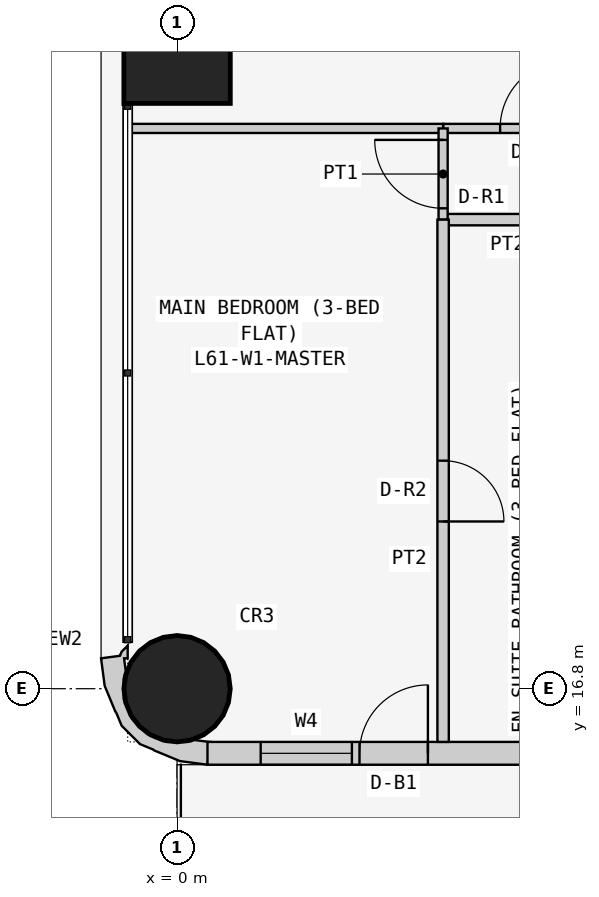
"""IFC4 building model, lengths in metres.
Left out: names, types, materials, properties, quantities, classifications, styles, units other than length and angle.
Written with IfcOpenShell. Run it as: python <this file> out.ifc"""

import sys

from ifc_helpers import new_model, si_unit, direction, frame, frame_2d, origin, origin_2d, place, context, subcontext, project, spatial, polyline, rectangle, circle, outline, extrude, element, fill, save


model = new_model("IFC4")
c1 = context("Model", 3, precision=1e-05, world=origin(), true_north=direction((0.0, 1.0)))
c2 = subcontext(c1, "Body", "Model", "MODEL_VIEW")
j1 = project(units=[si_unit("LENGTHUNIT", "METRE"), si_unit("PLANEANGLEUNIT", "RADIAN")], contexts=[c1])
p1 = place(None, origin())
s1 = spatial("IfcSite", under=j1, at=p1, CompositionType="ELEMENT")
p2 = place(p1, origin())
s2 = spatial("IfcBuilding", under=s1, at=p2, CompositionType="ELEMENT")
p3 = place(p2, frame((0.0, 0.0, 233.7)))
s3 = spatial("IfcBuildingStorey", under=s2, at=p3, CompositionType="ELEMENT", Elevation=233.7)
p4 = place(p3, frame((0.0, 16.8, 0.0), z_axis=(0.0, 0.0, 1.0), x_axis=(1.0, 0.0, 0.0)))
e1 = element("IfcColumn", 1, at=p4, inside=s3, PredefinedType="COLUMN", context=c2, shape_type="SweptSolid", body=[
    extrude(circle(Radius=0.7, at=origin_2d()), origin(), (0.0, 0.0, 1.0), 3.6),
])
p5 = place(p3, frame((0.0, 25.2, 0.0), z_axis=(0.0, 0.0, 1.0), x_axis=(1.0, 0.0, 0.0)))
e2 = element("IfcColumn", 2, at=p5, inside=s3, PredefinedType="COLUMN", context=c2, shape_type="SweptSolid", body=[
    extrude(rectangle(XDim=1.4, YDim=1.4, at=origin_2d()), origin(), (0.0, 0.0, 1.0), 3.6),
])
p6 = place(p3, frame((0.4, 15.95, 0.0), z_axis=(0.0, 0.0, 1.0), x_axis=(1.0, 0.0, 0.0)))
e3 = element("IfcWall", 3, at=p6, inside=s3, PredefinedType="SOLIDWALL", context=c2, shape_type="SweptSolid", body=[
    extrude(rectangle(XDim=15.7, YDim=0.3, at=frame_2d((7.85, 0.0))), origin(), (0.0, 0.0, 1.0), 3.45),
])
p7 = place(p6, frame((12.4, 0.0, 0.9)))
e4 = element("IfcOpeningElement", 4, at=p7, cuts=e3, PredefinedType="OPENING", context=c2, shape_type="SweptSolid", body=[
    extrude(rectangle(XDim=1.8, YDim=1.5, at=frame_2d((0.9, 0.75))), frame((0.0, 0.16, 0.0), z_axis=(0.0, -1.0, 0.0), x_axis=(1.0, 0.0, 0.0)), (0.0, 0.0, 1.0), 0.32),
])
p8 = place(p6, frame((9.55, 0.0, 1.5)))
e5 = element("IfcOpeningElement", 5, at=p8, cuts=e3, PredefinedType="OPENING", context=c2, shape_type="SweptSolid", body=[
    extrude(rectangle(XDim=0.9, YDim=0.7, at=frame_2d((0.45, 0.35))), frame((0.0, 0.16, 0.0), z_axis=(0.0, -1.0, 0.0), x_axis=(1.0, 0.0, 0.0)), (0.0, 0.0, 1.0), 0.32),
])
p9 = place(p6, frame((5.1, 0.0, 0.9)))
e6 = element("IfcOpeningElement", 6, at=p9, cuts=e3, PredefinedType="OPENING", context=c2, shape_type="SweptSolid", body=[
    extrude(rectangle(XDim=1.8, YDim=1.5, at=frame_2d((0.9, 0.75))), frame((0.0, 0.16, 0.0), z_axis=(0.0, -1.0, 0.0), x_axis=(1.0, 0.0, 0.0)), (0.0, 0.0, 1.0), 0.32),
])
p10 = place(p6, frame((2.0, 0.0, 0.0)))
e7 = element("IfcOpeningElement", 7, at=p10, cuts=e3, PredefinedType="OPENING", context=c2, shape_type="SweptSolid", body=[
    extrude(rectangle(XDim=0.9, YDim=2.4, at=frame_2d((0.45, 1.2))), frame((0.0, 0.16, 0.0), z_axis=(0.0, -1.0, 0.0), x_axis=(1.0, 0.0, 0.0)), (0.0, 0.0, 1.0), 0.32),
])
p11 = place(p6, frame((0.7, 0.0, 0.9)))
e8 = element("IfcOpeningElement", 8, at=p11, cuts=e3, PredefinedType="OPENING", context=c2, shape_type="SweptSolid", body=[
    extrude(rectangle(XDim=1.2, YDim=1.5, at=frame_2d((0.6, 0.75))), frame((0.0, 0.16, 0.0), z_axis=(0.0, -1.0, 0.0), x_axis=(1.0, 0.0, 0.0)), (0.0, 0.0, 1.0), 0.32),
])
p12 = place(p3, frame((-0.588, 17.312, 0.0), z_axis=(0.0, 0.0, 1.0), x_axis=(-0.898030234854, -0.439933741929, 0.0)))
e9 = element("IfcWall", 9, at=p12, inside=s3, PredefinedType="SOLIDWALL", context=c2, shape_type="SweptSolid", body=[
    extrude(outline(polyline([(-0.222, 1.793), (-0.39, 1.541), (-0.372, 1.532), (-0.195, 1.415), (-0.12, 1.41), (0.131, 1.287), (0.315, 1.078), (0.406, 0.814), (0.388, 0.536), (0.265, 0.285), (0.209, 0.236), (0.148, 0.053), (0.105, 0.074), (0.032, -0.076), (0.138, -0.039), (0.182, -0.0), (0.419, -0.08), (0.536, 0.266), (0.559, 0.631), (0.555, 0.651), (0.566, 0.836), (0.456, 1.159), (0.333, 1.298), (0.324, 1.316), (0.082, 1.591), (-0.222, 1.793)])), origin(), (0.0, 0.0, 1.0), 3.45),
])
p13 = place(p3, frame((3.5, 24.171, 0.0), z_axis=(0.0, 0.0, 1.0), x_axis=(1.0, 0.0, 0.0)))
e10 = element("IfcWall", 10, at=p13, inside=s3, PredefinedType="PARTITIONING", context=c2, shape_type="SweptSolid", body=[
    extrude(rectangle(XDim=4.05, YDim=0.12, at=frame_2d((2.025, 0.0))), origin(), (0.0, 0.0, 1.0), 3.45),
])
p14 = place(p13, frame((0.75, 0.0, 0.0)))
e11 = element("IfcOpeningElement", 11, at=p14, cuts=e10, PredefinedType="OPENING", context=c2, shape_type="SweptSolid", body=[
    extrude(rectangle(XDim=0.9, YDim=2.1, at=frame_2d((0.45, 1.05))), frame((0.0, 0.07, 0.0), z_axis=(0.0, -1.0, 0.0), x_axis=(1.0, 0.0, 0.0)), (0.0, 0.0, 1.0), 0.14),
])
p15 = place(p3, frame((-0.65, 24.171, 0.0), z_axis=(0.0, 0.0, 1.0), x_axis=(1.0, 0.0, 0.0)))
e12 = element("IfcWall", 12, at=p15, inside=s3, PredefinedType="PARTITIONING", context=c2, shape_type="SweptSolid", body=[
    extrude(rectangle(XDim=4.15, YDim=0.12, at=frame_2d((2.075, 0.0))), origin(), (0.0, 0.0, 1.0), 3.45),
])
p16 = place(p3, frame((3.5, 22.971, 0.0), z_axis=(0.0, 0.0, 1.0), x_axis=(1.0, 0.0, 0.0)))
e13 = element("IfcWall", 13, at=p16, inside=s3, PredefinedType="PARTITIONING", context=c2, shape_type="SweptSolid", body=[
    extrude(rectangle(XDim=1.7, YDim=0.15, at=frame_2d((0.85, 0.0))), origin(), (0.0, 0.0, 1.0), 3.45),
])
p17 = place(p3, frame((3.5, 24.171, 0.0), z_axis=(0.0, 0.0, 1.0), x_axis=(0.0, -1.0, 0.0)))
e14 = element("IfcWall", 14, at=p17, inside=s3, PredefinedType="PARTITIONING", context=c2, shape_type="SweptSolid", body=[
    extrude(rectangle(XDim=1.2, YDim=0.12, at=frame_2d((0.6, 0.0))), origin(), (0.0, 0.0, 1.0), 3.45),
])
p18 = place(p17, frame((0.151, 0.0, 0.0)))
e15 = element("IfcOpeningElement", 15, at=p18, cuts=e14, PredefinedType="OPENING", context=c2, shape_type="SweptSolid", body=[
    extrude(rectangle(XDim=0.9, YDim=2.1, at=frame_2d((0.45, 1.05))), frame((0.0, 0.07, 0.0), z_axis=(0.0, -1.0, 0.0), x_axis=(1.0, 0.0, 0.0)), (0.0, 0.0, 1.0), 0.14),
])
p19 = place(p3, frame((3.5, 22.971, 0.0), z_axis=(0.0, 0.0, 1.0), x_axis=(0.0, -1.0, 0.0)))
e16 = element("IfcWall", 16, at=p19, inside=s3, PredefinedType="PARTITIONING", context=c2, shape_type="SweptSolid", body=[
    extrude(rectangle(XDim=6.871, YDim=0.15, at=frame_2d((3.436, 0.0))), origin(), (0.0, 0.0, 1.0), 3.45),
])
p20 = place(p19, frame((3.171, 0.0, 0.0)))
e17 = element("IfcOpeningElement", 17, at=p20, cuts=e16, PredefinedType="OPENING", context=c2, shape_type="SweptSolid", body=[
    extrude(rectangle(XDim=0.8, YDim=2.1, at=frame_2d((0.4, 1.05))), frame((0.0, 0.085, 0.0), z_axis=(0.0, -1.0, 0.0), x_axis=(1.0, 0.0, 0.0)), (0.0, 0.0, 1.0), 0.17),
])
p21 = place(p10, origin())
e18 = element("IfcDoor", 18, at=p21, inside=s3, OperationType="SINGLE_SWING_RIGHT", PredefinedType="DOOR", context=c2, shape_type="SweptSolid", body=[
    extrude(rectangle(XDim=0.9, YDim=2.4, at=frame_2d((0.45, 1.2))), frame((0.0, 0.025, 0.0), z_axis=(0.0, -1.0, 0.0), x_axis=(1.0, 0.0, 0.0)), (0.0, 0.0, 1.0), 0.05),
])
fill(e7, e18)
p22 = place(p11, origin())
e19 = element("IfcWindow", 19, at=p22, inside=s3, PartitioningType="SINGLE_PANEL", PredefinedType="WINDOW", context=c2, shape_type="SweptSolid", body=[
    extrude(rectangle(XDim=1.2, YDim=1.5, at=frame_2d((0.6, 0.75))), frame((0.0, 0.03, 0.0), z_axis=(0.0, -1.0, 0.0), x_axis=(1.0, 0.0, 0.0)), (0.0, 0.0, 1.0), 0.06),
])
fill(e8, e19)
p23 = place(p14, origin())
e20 = element("IfcDoor", 20, at=p23, inside=s3, OperationType="SINGLE_SWING_RIGHT", PredefinedType="DOOR", context=c2, shape_type="SweptSolid", body=[
    extrude(rectangle(XDim=0.9, YDim=2.1, at=frame_2d((0.45, 1.05))), frame((0.0, 0.025, 0.0), z_axis=(0.0, -1.0, 0.0), x_axis=(1.0, 0.0, 0.0)), (0.0, 0.0, 1.0), 0.05),
])
fill(e11, e20)
p24 = place(p18, frame((0.9, 0.0, 0.0), z_axis=(0.0, 0.0, 1.0), x_axis=(-1.0, 0.0, 0.0)))
e21 = element("IfcDoor", 21, at=p24, inside=s3, OperationType="SINGLE_SWING_RIGHT", PredefinedType="DOOR", context=c2, shape_type="SweptSolid", body=[
    extrude(rectangle(XDim=0.9, YDim=2.1, at=frame_2d((0.45, 1.05))), frame((0.0, 0.025, 0.0), z_axis=(0.0, -1.0, 0.0), x_axis=(1.0, 0.0, 0.0)), (0.0, 0.0, 1.0), 0.05),
])
fill(e15, e21)
p25 = place(p20, origin())
e22 = element("IfcDoor", 22, at=p25, inside=s3, OperationType="SINGLE_SWING_RIGHT", PredefinedType="DOOR", context=c2, shape_type="SweptSolid", body=[
    extrude(rectangle(XDim=0.8, YDim=2.1, at=frame_2d((0.4, 1.05))), frame((0.0, 0.025, 0.0), z_axis=(0.0, -1.0, 0.0), x_axis=(1.0, 0.0, 0.0)), (0.0, 0.0, 1.0), 0.05),
])
fill(e17, e22)
save(model, sys.argv[1])
